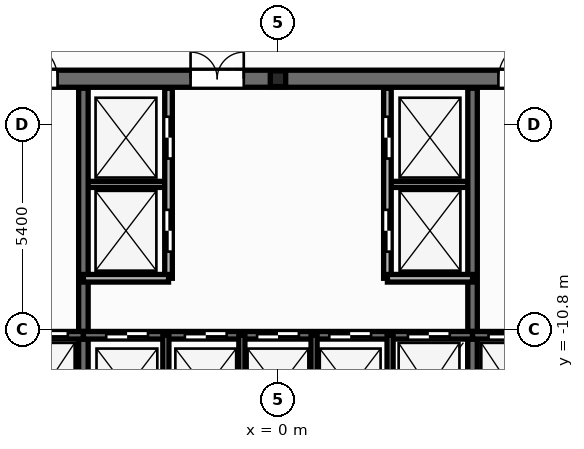
"""IFC4 building model, lengths in metres.
Left out: names, types, materials, properties, quantities, classifications, styles, units other than length and angle.
Written with IfcOpenShell. Run it as: python <this file> out.ifc"""

import sys

from ifc_helpers import new_model, si_unit, direction, frame, frame_2d, origin, origin_2d, place, context, subcontext, project, spatial, rectangle, i_section, extrude, element, fill, save


model = new_model("IFC4")
c1 = context("Model", 3, precision=1e-05, world=origin(), true_north=direction((0.0, 1.0)))
c2 = subcontext(c1, "Body", "Model", "MODEL_VIEW")
j1 = project(units=[si_unit("LENGTHUNIT", "METRE"), si_unit("PLANEANGLEUNIT", "RADIAN")], contexts=[c1])
p1 = place(None, origin())
s1 = spatial("IfcSite", under=j1, at=p1, CompositionType="ELEMENT")
p2 = place(p1, origin())
s2 = spatial("IfcBuilding", under=s1, at=p2, CompositionType="ELEMENT")
p3 = place(p2, origin())
s3 = spatial("IfcBuildingStorey", under=s2, at=p3, CompositionType="ELEMENT", Elevation=0.0)
p4 = place(p3, frame((0.0, -4.2, 0.0), z_axis=(0.0, 0.0, 1.0), x_axis=(1.0, 0.0, 0.0)))
e1 = element("IfcColumn", 1, at=p4, inside=s3, PredefinedType="PILASTER", context=c2, shape_type="SweptSolid", body=[
    extrude(i_section(OverallWidth=0.405, OverallDepth=0.414, WebThickness=0.022, FlangeThickness=0.032, at=origin_2d()), origin(), (0.0, 0.0, 1.0), 5.4),
])
p5 = place(p3, frame((5.583, 11.29, -0.015), z_axis=(0.0, 0.0, 1.0), x_axis=(0.616945483616, -0.787005889588, 0.0)))
e2 = element("IfcWall", 2, at=p5, inside=s3, PredefinedType="STANDARD", context=c2, shape_type="SweptSolid", body=[
    extrude(rectangle(XDim=28.627, YDim=0.28, at=frame_2d((14.314, 0.0))), origin(), (0.0, 0.0, 1.0), 3.91),
])
p6 = place(p5, frame((2.979, 0.0, 0.015)))
e3 = element("IfcOpeningElement", 3, at=p6, cuts=e2, PredefinedType="OPENING", context=c2, shape_type="SweptSolid", body=[
    extrude(rectangle(XDim=1.206, YDim=2.154, at=frame_2d((0.6, 1.077))), frame((0.0, 0.15, 0.0), z_axis=(0.0, -1.0, 0.0), x_axis=(1.0, 0.0, 0.0)), (0.0, 0.0, 1.0), 0.3),
])
p7 = place(p3, frame((-23.245, -11.24, -0.015), z_axis=(0.0, 0.0, 1.0), x_axis=(0.616945483616, 0.787005889588, 0.0)))
e4 = element("IfcWall", 4, at=p7, inside=s3, PredefinedType="STANDARD", context=c2, shape_type="SweptSolid", body=[
    extrude(rectangle(XDim=28.627, YDim=0.28, at=frame_2d((14.314, 0.0))), origin(), (0.0, 0.0, 1.0), 3.91),
])
for number, where, z_axis, x_axis in (
    (5, (-5.12, -6.98, 0.0), (0.0, 0.0, 1.0), (1.0, 0.0, 0.0)),
    (6, (2.88, -6.98, 0.0), (0.0, 0.0, 1.0), (1.0, 0.0, 0.0)),
):
    element("IfcWall", number, at=place(p3, frame(where, z_axis=z_axis, x_axis=x_axis)), inside=s3, PredefinedType="PARTITIONING", context=c2, shape_type="SweptSolid", body=[
        extrude(rectangle(XDim=2.24, YDim=0.16, at=frame_2d((1.12, 0.0))), origin(), (0.0, 0.0, 1.0), 5.12),
    ])
p8 = place(p3, frame((-12.65, -4.2, 0.0), z_axis=(0.0, 0.0, 1.0), x_axis=(1.0, 0.0, 0.0)))
e7 = element("IfcWall", 7, at=p8, inside=s3, PredefinedType="SHEAR", context=c2, shape_type="SweptSolid", body=[
    extrude(rectangle(XDim=25.3, YDim=0.45, at=frame_2d((12.65, 0.0))), origin(), (0.0, 0.0, 1.0), 5.4),
])
p9 = place(p8, frame((1.85, 0.0, 0.0)))
e8 = element("IfcOpeningElement", 8, at=p9, cuts=e7, PredefinedType="OPENING", context=c2, shape_type="SweptSolid", body=[
    extrude(rectangle(XDim=0.756, YDim=2.054, at=frame_2d((0.375, 1.027))), frame((0.0, 0.235, 0.0), z_axis=(0.0, -1.0, 0.0), x_axis=(1.0, 0.0, 0.0)), (0.0, 0.0, 1.0), 0.47),
])
p10 = place(p8, frame((22.65, 0.0, 0.0)))
e9 = element("IfcOpeningElement", 9, at=p10, cuts=e7, PredefinedType="OPENING", context=c2, shape_type="SweptSolid", body=[
    extrude(rectangle(XDim=0.756, YDim=2.054, at=frame_2d((0.375, 1.027))), frame((0.0, 0.235, 0.0), z_axis=(0.0, -1.0, 0.0), x_axis=(1.0, 0.0, 0.0)), (0.0, 0.0, 1.0), 0.47),
])
p11 = place(p8, frame((5.85, 0.0, 0.0)))
e10 = element("IfcOpeningElement", 10, at=p11, cuts=e7, PredefinedType="OPENING", context=c2, shape_type="SweptSolid", body=[
    extrude(rectangle(XDim=1.006, YDim=2.104, at=frame_2d((0.5, 1.052))), frame((0.0, 0.235, 0.0), z_axis=(0.0, -1.0, 0.0), x_axis=(1.0, 0.0, 0.0)), (0.0, 0.0, 1.0), 0.47),
])
p12 = place(p8, frame((10.35, 0.0, 0.0)))
e11 = element("IfcOpeningElement", 11, at=p12, cuts=e7, PredefinedType="OPENING", context=c2, shape_type="SweptSolid", body=[
    extrude(rectangle(XDim=1.406, YDim=2.154, at=frame_2d((0.7, 1.077))), frame((0.0, 0.235, 0.0), z_axis=(0.0, -1.0, 0.0), x_axis=(1.0, 0.0, 0.0)), (0.0, 0.0, 1.0), 0.47),
])
p13 = place(p8, frame((18.45, 0.0, 0.0)))
e12 = element("IfcOpeningElement", 12, at=p13, cuts=e7, PredefinedType="OPENING", context=c2, shape_type="SweptSolid", body=[
    extrude(rectangle(XDim=1.006, YDim=2.104, at=frame_2d((0.5, 1.052))), frame((0.0, 0.235, 0.0), z_axis=(0.0, -1.0, 0.0), x_axis=(1.0, 0.0, 0.0)), (0.0, 0.0, 1.0), 0.47),
])
for number, where, z_axis, x_axis in (
    (13, (-5.12, -13.85, 0.0), (0.0, 0.0, 1.0), (0.0, 1.0, 0.0)),
    (14, (5.12, -13.85, 0.0), (0.0, 0.0, 1.0), (0.0, 1.0, 0.0)),
):
    element("IfcWall", number, at=place(p3, frame(where, z_axis=z_axis, x_axis=x_axis)), inside=s3, PredefinedType="SHEAR", context=c2, shape_type="SweptSolid", body=[
        extrude(rectangle(XDim=9.4, YDim=0.25, at=frame_2d((4.7, 0.0))), origin(), (0.0, 0.0, 1.0), 5.4),
    ])
p14 = place(p3, frame((-8.48, -10.95, 0.0), z_axis=(0.0, 0.0, 1.0), x_axis=(1.0, 0.0, 0.0)))
e15 = element("IfcWall", 15, at=p14, inside=s3, PredefinedType="SOLIDWALL", context=c2, shape_type="SweptSolid", body=[
    extrude(rectangle(XDim=3.36, YDim=0.2, at=frame_2d((1.68, 0.0))), origin(), (0.0, 0.0, 1.0), 5.4),
])
p15 = place(p14, frame((0.28, 0.0, 0.0)))
e16 = element("IfcOpeningElement", 16, at=p15, cuts=e15, PredefinedType="OPENING", context=c2, shape_type="SweptSolid", body=[
    extrude(rectangle(XDim=0.756, YDim=2.054, at=frame_2d((0.375, 1.027))), frame((0.0, 0.11, 0.0), z_axis=(0.0, -1.0, 0.0), x_axis=(1.0, 0.0, 0.0)), (0.0, 0.0, 1.0), 0.22),
])
p16 = place(p14, frame((1.85, 0.0, 0.0)))
e17 = element("IfcOpeningElement", 17, at=p16, cuts=e15, PredefinedType="OPENING", context=c2, shape_type="SweptSolid", body=[
    extrude(rectangle(XDim=1.106, YDim=2.104, at=frame_2d((0.55, 1.052))), frame((0.0, 0.11, 0.0), z_axis=(0.0, -1.0, 0.0), x_axis=(1.0, 0.0, 0.0)), (0.0, 0.0, 1.0), 0.22),
])
p17 = place(p3, frame((-5.12, -10.95, 0.0), z_axis=(0.0, 0.0, 1.0), x_axis=(1.0, 0.0, 0.0)))
e18 = element("IfcWall", 18, at=p17, inside=s3, PredefinedType="SOLIDWALL", context=c2, shape_type="SweptSolid", body=[
    extrude(rectangle(XDim=10.24, YDim=0.2, at=frame_2d((5.12, 0.0))), origin(), (0.0, 0.0, 1.0), 5.4),
])
p18 = place(p17, frame((0.6, 0.0, 0.0)))
e19 = element("IfcOpeningElement", 19, at=p18, cuts=e18, PredefinedType="OPENING", context=c2, shape_type="SweptSolid", body=[
    extrude(rectangle(XDim=1.106, YDim=2.104, at=frame_2d((0.55, 1.052))), frame((0.0, 0.11, 0.0), z_axis=(0.0, -1.0, 0.0), x_axis=(1.0, 0.0, 0.0)), (0.0, 0.0, 1.0), 0.22),
])
p19 = place(p17, frame((2.67, 0.0, 0.0)))
e20 = element("IfcOpeningElement", 20, at=p19, cuts=e18, PredefinedType="OPENING", context=c2, shape_type="SweptSolid", body=[
    extrude(rectangle(XDim=1.106, YDim=2.104, at=frame_2d((0.55, 1.052))), frame((0.0, 0.11, 0.0), z_axis=(0.0, -1.0, 0.0), x_axis=(1.0, 0.0, 0.0)), (0.0, 0.0, 1.0), 0.22),
])
p20 = place(p17, frame((4.57, 0.0, 0.0)))
e21 = element("IfcOpeningElement", 21, at=p20, cuts=e18, PredefinedType="OPENING", context=c2, shape_type="SweptSolid", body=[
    extrude(rectangle(XDim=1.106, YDim=2.104, at=frame_2d((0.55, 1.052))), frame((0.0, 0.11, 0.0), z_axis=(0.0, -1.0, 0.0), x_axis=(1.0, 0.0, 0.0)), (0.0, 0.0, 1.0), 0.22),
])
p21 = place(p17, frame((6.47, 0.0, 0.0)))
e22 = element("IfcOpeningElement", 22, at=p21, cuts=e18, PredefinedType="OPENING", context=c2, shape_type="SweptSolid", body=[
    extrude(rectangle(XDim=1.106, YDim=2.104, at=frame_2d((0.55, 1.052))), frame((0.0, 0.11, 0.0), z_axis=(0.0, -1.0, 0.0), x_axis=(1.0, 0.0, 0.0)), (0.0, 0.0, 1.0), 0.22),
])
p22 = place(p17, frame((8.54, 0.0, 0.0)))
e23 = element("IfcOpeningElement", 23, at=p22, cuts=e18, PredefinedType="OPENING", context=c2, shape_type="SweptSolid", body=[
    extrude(rectangle(XDim=1.106, YDim=2.104, at=frame_2d((0.55, 1.052))), frame((0.0, 0.11, 0.0), z_axis=(0.0, -1.0, 0.0), x_axis=(1.0, 0.0, 0.0)), (0.0, 0.0, 1.0), 0.22),
])
p23 = place(p3, frame((5.12, -10.95, 0.0), z_axis=(0.0, 0.0, 1.0), x_axis=(1.0, 0.0, 0.0)))
e24 = element("IfcWall", 24, at=p23, inside=s3, PredefinedType="SOLIDWALL", context=c2, shape_type="SweptSolid", body=[
    extrude(rectangle(XDim=3.36, YDim=0.2, at=frame_2d((1.68, 0.0))), origin(), (0.0, 0.0, 1.0), 5.4),
])
p24 = place(p23, frame((0.42, 0.0, 0.0)))
e25 = element("IfcOpeningElement", 25, at=p24, cuts=e24, PredefinedType="OPENING", context=c2, shape_type="SweptSolid", body=[
    extrude(rectangle(XDim=1.106, YDim=2.104, at=frame_2d((0.55, 1.052))), frame((0.0, 0.11, 0.0), z_axis=(0.0, -1.0, 0.0), x_axis=(1.0, 0.0, 0.0)), (0.0, 0.0, 1.0), 0.22),
])
p25 = place(p23, frame((2.3, 0.0, 0.0)))
e26 = element("IfcOpeningElement", 26, at=p25, cuts=e24, PredefinedType="OPENING", context=c2, shape_type="SweptSolid", body=[
    extrude(rectangle(XDim=0.756, YDim=2.054, at=frame_2d((0.375, 1.027))), frame((0.0, 0.11, 0.0), z_axis=(0.0, -1.0, 0.0), x_axis=(1.0, 0.0, 0.0)), (0.0, 0.0, 1.0), 0.22),
])
for number, where, z_axis, x_axis in (
    (27, (-2.95, -13.85, 0.0), (0.0, 0.0, 1.0), (0.0, 1.0, 0.0)),
    (28, (2.95, -13.85, 0.0), (0.0, 0.0, 1.0), (0.0, 1.0, 0.0)),
):
    element("IfcWall", number, at=place(p3, frame(where, z_axis=z_axis, x_axis=x_axis)), inside=s3, PredefinedType="PARTITIONING", context=c2, shape_type="SweptSolid", body=[
        extrude(rectangle(XDim=2.9, YDim=0.16, at=frame_2d((1.45, 0.0))), origin(), (0.0, 0.0, 1.0), 4.145),
    ])
p26 = place(p3, frame((-2.88, -9.45, 0.0), z_axis=(0.0, 0.0, 1.0), x_axis=(0.0, 1.0, 0.0)))
e29 = element("IfcWall", 29, at=p26, inside=s3, PredefinedType="SOLIDWALL", context=c2, shape_type="SweptSolid", body=[
    extrude(rectangle(XDim=5.0, YDim=0.2, at=frame_2d((2.5, 0.0))), origin(), (0.0, 0.0, 1.0), 5.12),
])
p27 = place(p26, frame((0.7, 0.0, 0.0)))
e30 = element("IfcOpeningElement", 30, at=p27, cuts=e29, PredefinedType="OPENING", context=c2, shape_type="SweptSolid", body=[
    extrude(rectangle(XDim=1.106, YDim=2.104, at=frame_2d((0.55, 1.052))), frame((0.0, 0.11, 0.0), z_axis=(0.0, -1.0, 0.0), x_axis=(1.0, 0.0, 0.0)), (0.0, 0.0, 1.0), 0.22),
])
p28 = place(p26, frame((3.15, 0.0, 0.0)))
e31 = element("IfcOpeningElement", 31, at=p28, cuts=e29, PredefinedType="OPENING", context=c2, shape_type="SweptSolid", body=[
    extrude(rectangle(XDim=1.106, YDim=2.104, at=frame_2d((0.55, 1.052))), frame((0.0, 0.11, 0.0), z_axis=(0.0, -1.0, 0.0), x_axis=(1.0, 0.0, 0.0)), (0.0, 0.0, 1.0), 0.22),
])
p29 = place(p3, frame((-5.12, -9.45, 0.0), z_axis=(0.0, 0.0, 1.0), x_axis=(1.0, 0.0, 0.0)))
e32 = element("IfcWall", 32, at=p29, inside=s3, PredefinedType="SOLIDWALL", context=c2, shape_type="SweptSolid", body=[
    extrude(rectangle(XDim=2.24, YDim=0.2, at=frame_2d((1.12, 0.0))), origin(), (0.0, 0.0, 1.0), 5.12),
])
p30 = place(p3, frame((2.88, -9.45, 0.0), z_axis=(0.0, 0.0, 1.0), x_axis=(0.0, 1.0, 0.0)))
e33 = element("IfcWall", 33, at=p30, inside=s3, PredefinedType="SOLIDWALL", context=c2, shape_type="SweptSolid", body=[
    extrude(rectangle(XDim=5.0, YDim=0.2, at=frame_2d((2.5, 0.0))), origin(), (0.0, 0.0, 1.0), 5.12),
])
p31 = place(p30, frame((0.7, 0.0, 0.0)))
e34 = element("IfcOpeningElement", 34, at=p31, cuts=e33, PredefinedType="OPENING", context=c2, shape_type="SweptSolid", body=[
    extrude(rectangle(XDim=1.106, YDim=2.104, at=frame_2d((0.55, 1.052))), frame((0.0, 0.11, 0.0), z_axis=(0.0, -1.0, 0.0), x_axis=(1.0, 0.0, 0.0)), (0.0, 0.0, 1.0), 0.22),
])
p32 = place(p30, frame((3.15, 0.0, 0.0)))
e35 = element("IfcOpeningElement", 35, at=p32, cuts=e33, PredefinedType="OPENING", context=c2, shape_type="SweptSolid", body=[
    extrude(rectangle(XDim=1.106, YDim=2.104, at=frame_2d((0.55, 1.052))), frame((0.0, 0.11, 0.0), z_axis=(0.0, -1.0, 0.0), x_axis=(1.0, 0.0, 0.0)), (0.0, 0.0, 1.0), 0.22),
])
p33 = place(p3, frame((2.88, -9.45, 0.0), z_axis=(0.0, 0.0, 1.0), x_axis=(1.0, 0.0, 0.0)))
e36 = element("IfcWall", 36, at=p33, inside=s3, PredefinedType="SOLIDWALL", context=c2, shape_type="SweptSolid", body=[
    extrude(rectangle(XDim=2.24, YDim=0.2, at=frame_2d((1.12, 0.0))), origin(), (0.0, 0.0, 1.0), 5.12),
])
for number, where, z_axis, x_axis in (
    (37, (-0.95, -13.85, 0.0), (0.0, 0.0, 1.0), (0.0, 1.0, 0.0)),
    (38, (0.95, -13.85, 0.0), (0.0, 0.0, 1.0), (0.0, 1.0, 0.0)),
):
    element("IfcWall", number, at=place(p3, frame(where, z_axis=z_axis, x_axis=x_axis)), inside=s3, PredefinedType="PARTITIONING", context=c2, shape_type="SweptSolid", body=[
        extrude(rectangle(XDim=2.9, YDim=0.16, at=frame_2d((1.45, 0.0))), origin(), (0.0, 0.0, 1.0), 4.145),
    ])
p34 = place(p27, origin())
e39 = element("IfcDoor", 39, at=p34, inside=s3, OperationType="DOUBLE_DOOR_SLIDING", PredefinedType="DOOR", context=c2, shape_type="SweptSolid", body=[
    extrude(rectangle(XDim=1.1, YDim=2.1, at=frame_2d((0.55, 1.05))), frame((0.0, 0.025, 0.0), z_axis=(0.0, -1.0, 0.0), x_axis=(1.0, 0.0, 0.0)), (0.0, 0.0, 1.0), 0.05),
])
fill(e30, e39)
p35 = place(p28, origin())
e40 = element("IfcDoor", 40, at=p35, inside=s3, OperationType="DOUBLE_DOOR_SLIDING", PredefinedType="DOOR", context=c2, shape_type="SweptSolid", body=[
    extrude(rectangle(XDim=1.1, YDim=2.1, at=frame_2d((0.55, 1.05))), frame((0.0, 0.025, 0.0), z_axis=(0.0, -1.0, 0.0), x_axis=(1.0, 0.0, 0.0)), (0.0, 0.0, 1.0), 0.05),
])
fill(e31, e40)
p36 = place(p31, origin())
e41 = element("IfcDoor", 41, at=p36, inside=s3, OperationType="DOUBLE_DOOR_SLIDING", PredefinedType="DOOR", context=c2, shape_type="SweptSolid", body=[
    extrude(rectangle(XDim=1.1, YDim=2.1, at=frame_2d((0.55, 1.05))), frame((0.0, 0.025, 0.0), z_axis=(0.0, -1.0, 0.0), x_axis=(1.0, 0.0, 0.0)), (0.0, 0.0, 1.0), 0.05),
])
fill(e34, e41)
p37 = place(p32, origin())
e42 = element("IfcDoor", 42, at=p37, inside=s3, OperationType="DOUBLE_DOOR_SLIDING", PredefinedType="DOOR", context=c2, shape_type="SweptSolid", body=[
    extrude(rectangle(XDim=1.1, YDim=2.1, at=frame_2d((0.55, 1.05))), frame((0.0, 0.025, 0.0), z_axis=(0.0, -1.0, 0.0), x_axis=(1.0, 0.0, 0.0)), (0.0, 0.0, 1.0), 0.05),
])
fill(e35, e42)
p38 = place(p16, origin())
e43 = element("IfcDoor", 43, at=p38, inside=s3, OperationType="DOUBLE_DOOR_SLIDING", PredefinedType="DOOR", context=c2, shape_type="SweptSolid", body=[
    extrude(rectangle(XDim=1.1, YDim=2.1, at=frame_2d((0.55, 1.05))), frame((0.0, 0.025, 0.0), z_axis=(0.0, -1.0, 0.0), x_axis=(1.0, 0.0, 0.0)), (0.0, 0.0, 1.0), 0.05),
])
fill(e17, e43)
p39 = place(p24, origin())
e44 = element("IfcDoor", 44, at=p39, inside=s3, OperationType="DOUBLE_DOOR_SLIDING", PredefinedType="DOOR", context=c2, shape_type="SweptSolid", body=[
    extrude(rectangle(XDim=1.1, YDim=2.1, at=frame_2d((0.55, 1.05))), frame((0.0, 0.025, 0.0), z_axis=(0.0, -1.0, 0.0), x_axis=(1.0, 0.0, 0.0)), (0.0, 0.0, 1.0), 0.05),
])
fill(e25, e44)
p40 = place(p18, origin())
e45 = element("IfcDoor", 45, at=p40, inside=s3, OperationType="DOUBLE_DOOR_SLIDING", PredefinedType="DOOR", context=c2, shape_type="SweptSolid", body=[
    extrude(rectangle(XDim=1.1, YDim=2.1, at=frame_2d((0.55, 1.05))), frame((0.0, 0.025, 0.0), z_axis=(0.0, -1.0, 0.0), x_axis=(1.0, 0.0, 0.0)), (0.0, 0.0, 1.0), 0.05),
])
fill(e19, e45)
p41 = place(p19, origin())
e46 = element("IfcDoor", 46, at=p41, inside=s3, OperationType="DOUBLE_DOOR_SLIDING", PredefinedType="DOOR", context=c2, shape_type="SweptSolid", body=[
    extrude(rectangle(XDim=1.1, YDim=2.1, at=frame_2d((0.55, 1.05))), frame((0.0, 0.025, 0.0), z_axis=(0.0, -1.0, 0.0), x_axis=(1.0, 0.0, 0.0)), (0.0, 0.0, 1.0), 0.05),
])
fill(e20, e46)
p42 = place(p20, origin())
e47 = element("IfcDoor", 47, at=p42, inside=s3, OperationType="DOUBLE_DOOR_SLIDING", PredefinedType="DOOR", context=c2, shape_type="SweptSolid", body=[
    extrude(rectangle(XDim=1.1, YDim=2.1, at=frame_2d((0.55, 1.05))), frame((0.0, 0.025, 0.0), z_axis=(0.0, -1.0, 0.0), x_axis=(1.0, 0.0, 0.0)), (0.0, 0.0, 1.0), 0.05),
])
fill(e21, e47)
p43 = place(p21, origin())
e48 = element("IfcDoor", 48, at=p43, inside=s3, OperationType="DOUBLE_DOOR_SLIDING", PredefinedType="DOOR", context=c2, shape_type="SweptSolid", body=[
    extrude(rectangle(XDim=1.1, YDim=2.1, at=frame_2d((0.55, 1.05))), frame((0.0, 0.025, 0.0), z_axis=(0.0, -1.0, 0.0), x_axis=(1.0, 0.0, 0.0)), (0.0, 0.0, 1.0), 0.05),
])
fill(e22, e48)
p44 = place(p22, origin())
e49 = element("IfcDoor", 49, at=p44, inside=s3, OperationType="DOUBLE_DOOR_SLIDING", PredefinedType="DOOR", context=c2, shape_type="SweptSolid", body=[
    extrude(rectangle(XDim=1.1, YDim=2.1, at=frame_2d((0.55, 1.05))), frame((0.0, 0.025, 0.0), z_axis=(0.0, -1.0, 0.0), x_axis=(1.0, 0.0, 0.0)), (0.0, 0.0, 1.0), 0.05),
])
fill(e23, e49)
p45 = place(p11, origin())
e50 = element("IfcDoor", 50, at=p45, inside=s3, OperationType="SINGLE_SWING_LEFT", PredefinedType="DOOR", context=c2, shape_type="SweptSolid", body=[
    extrude(rectangle(XDim=1.0, YDim=2.1, at=frame_2d((0.5, 1.05))), frame((0.0, 0.025, 0.0), z_axis=(0.0, -1.0, 0.0), x_axis=(1.0, 0.0, 0.0)), (0.0, 0.0, 1.0), 0.05),
])
fill(e10, e50)
p46 = place(p12, origin())
e51 = element("IfcDoor", 51, at=p46, inside=s3, OperationType="DOUBLE_DOOR_SINGLE_SWING", PredefinedType="DOOR", context=c2, shape_type="SweptSolid", body=[
    extrude(rectangle(XDim=1.4, YDim=2.15, at=frame_2d((0.7, 1.075))), frame((0.0, 0.025, 0.0), z_axis=(0.0, -1.0, 0.0), x_axis=(1.0, 0.0, 0.0)), (0.0, 0.0, 1.0), 0.05),
])
fill(e11, e51)
p47 = place(p13, origin())
e52 = element("IfcDoor", 52, at=p47, inside=s3, OperationType="SINGLE_SWING_RIGHT", PredefinedType="DOOR", context=c2, shape_type="SweptSolid", body=[
    extrude(rectangle(XDim=1.0, YDim=2.1, at=frame_2d((0.5, 1.05))), frame((0.0, 0.025, 0.0), z_axis=(0.0, -1.0, 0.0), x_axis=(1.0, 0.0, 0.0)), (0.0, 0.0, 1.0), 0.05),
])
fill(e12, e52)
save(model, sys.argv[1])
